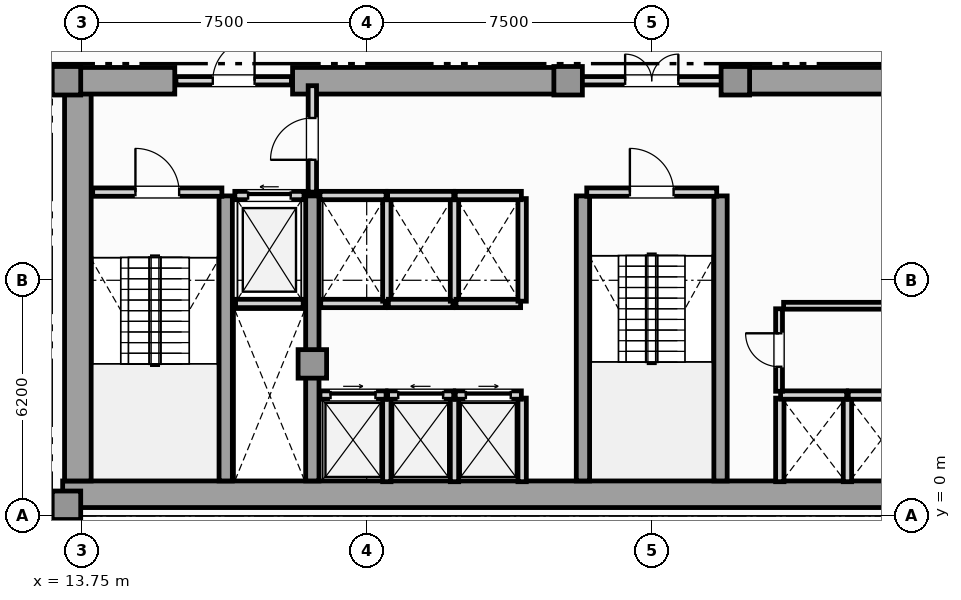
"""IFC4 building model, lengths in metres.
Left out: names, types, materials, properties, quantities, classifications, styles, units other than length and angle.
Written with IfcOpenShell. Run it as: python <this file> out.ifc"""

import sys

from ifc_helpers import new_model, si_unit, direction, frame, frame_2d, origin, origin_2d, place, context, subcontext, project, spatial, rectangle, extrude, element, fill, save


model = new_model("IFC4")
c1 = context("Model", 3, precision=1e-05, world=origin(), true_north=direction((0.0, 1.0)))
c2 = subcontext(c1, "Body", "Model", "MODEL_VIEW")
j1 = project(units=[si_unit("LENGTHUNIT", "METRE"), si_unit("PLANEANGLEUNIT", "RADIAN")], contexts=[c1])
p1 = place(None, origin())
s1 = spatial("IfcSite", under=j1, at=p1, CompositionType="ELEMENT")
p2 = place(p1, origin())
s2 = spatial("IfcBuilding", under=s1, at=p2, CompositionType="ELEMENT")
p3 = place(p2, frame((0.0, 0.0, 96.45)))
s3 = spatial("IfcBuildingStorey", under=s2, at=p3, CompositionType="ELEMENT", Elevation=96.45)
p4 = place(p3, frame((13.25, 0.57, 0.0), z_axis=(0.0, 0.0, 1.0), x_axis=(1.0, 0.0, 0.0)))
e1 = element("IfcWall", 1, at=p4, inside=s3, PredefinedType="SHEAR", context=c2, shape_type="SweptSolid", body=[
    extrude(rectangle(XDim=31.0, YDim=0.7, at=frame_2d((15.5, 0.0))), origin(), (0.0, 0.0, 1.0), 3.6),
])
p5 = place(p3, frame((13.65, 0.92, 0.0), z_axis=(0.0, 0.0, 1.0), x_axis=(0.0, 1.0, 0.0)))
e2 = element("IfcWall", 2, at=p5, inside=s3, PredefinedType="SHEAR", context=c2, shape_type="SweptSolid", body=[
    extrude(rectangle(XDim=10.53, YDim=0.7, at=frame_2d((5.265, 0.0))), origin(), (0.0, 0.0, 1.0), 3.6),
])
p6 = place(p3, frame((13.25, 11.45, 0.0), z_axis=(0.0, 0.0, 1.0), x_axis=(1.0, 0.0, 0.0)))
e3 = element("IfcWall", 3, at=p6, inside=s3, PredefinedType="SHEAR", context=c2, shape_type="SweptSolid", body=[
    extrude(rectangle(XDim=2.95, YDim=0.7, at=frame_2d((1.475, 0.0))), origin(), (0.0, 0.0, 1.0), 3.6),
])
for number, where, z_axis, x_axis in (
    (4, (19.3, 11.45, 0.0), (0.0, 0.0, 1.0), (1.0, 0.0, 0.0)),
    (5, (30.9, 11.45, 0.0), (0.0, 0.0, 1.0), (1.0, 0.0, 0.0)),
):
    element("IfcWall", number, at=place(p3, frame(where, z_axis=z_axis, x_axis=x_axis)), inside=s3, PredefinedType="SHEAR", context=c2, shape_type="SweptSolid", body=[
        extrude(rectangle(XDim=7.3, YDim=0.7, at=frame_2d((3.65, 0.0))), origin(), (0.0, 0.0, 1.0), 3.6),
    ])
for number, where, z_axis, x_axis in (
    (6, (17.54, 0.92, 0.0), (0.0, 0.0, 1.0), (0.0, 1.0, 0.0)),
    (7, (19.82, 0.92, 0.0), (0.0, 0.0, 1.0), (0.0, 1.0, 0.0)),
    (8, (26.94, 0.92, 0.0), (0.0, 0.0, 1.0), (0.0, 1.0, 0.0)),
    (9, (30.56, 0.92, 0.0), (0.0, 0.0, 1.0), (0.0, 1.0, 0.0)),
):
    element("IfcWall", number, at=place(p3, frame(where, z_axis=z_axis, x_axis=x_axis)), inside=s3, PredefinedType="SHEAR", context=c2, shape_type="SweptSolid", body=[
        extrude(rectangle(XDim=7.5, YDim=0.35, at=frame_2d((3.75, 0.0))), origin(), (0.0, 0.0, 1.0), 3.6),
    ])
for number, where, z_axis, x_axis in (
    (10, (13.35, 0.28, 0.0), (0.0, 0.0, 1.0), (1.0, 0.0, 0.0)),
    (11, (13.35, 11.45, 0.0), (0.0, 0.0, 1.0), (1.0, 0.0, 0.0)),
    (12, (19.82, 4.0, 0.0), (0.0, 0.0, 1.0), (1.0, 0.0, 0.0)),
    (13, (26.55, 11.45, 0.0), (0.0, 0.0, 1.0), (1.0, 0.0, 0.0)),
    (14, (30.95, 11.45, 0.0), (0.0, 0.0, 1.0), (1.0, 0.0, 0.0)),
):
    element("IfcColumn", number, at=place(p3, frame(where, z_axis=z_axis, x_axis=x_axis)), inside=s3, PredefinedType="COLUMN", context=c2, shape_type="SweptSolid", body=[
        extrude(rectangle(XDim=0.75, YDim=0.75, at=origin_2d()), origin(), (0.0, 0.0, 1.0), 3.85),
    ])
p7 = place(p3, frame((5.84, 0.18, 0.0), z_axis=(0.0, 0.0, 1.0), x_axis=(1.0, 0.0, 0.0)))
e15 = element("IfcWall", 15, at=p7, inside=s3, PredefinedType="SOLIDWALL", context=c2, shape_type="SweptSolid", body=[
    extrude(rectangle(XDim=7.41, YDim=0.35, at=frame_2d((3.705, 0.0))), origin(), (0.0, 0.0, 1.0), 3.6),
])
p8 = place(p7, frame((2.655, 0.0, 0.85)))
e16 = element("IfcOpeningElement", 16, at=p8, cuts=e15, PredefinedType="OPENING", context=c2, shape_type="SweptSolid", body=[
    extrude(rectangle(XDim=2.1, YDim=2.05, at=frame_2d((1.05, 1.025))), frame((0.0, 0.185, 0.0), z_axis=(0.0, -1.0, 0.0), x_axis=(1.0, 0.0, 0.0)), (0.0, 0.0, 1.0), 0.37),
])
p9 = place(p3, frame((17.8, 5.59, 0.0), z_axis=(0.0, 0.0, 1.0), x_axis=(1.0, 0.0, 0.0)))
e17 = element("IfcWall", 17, at=p9, inside=s3, PredefinedType="SOLIDWALL", context=c2, shape_type="SweptSolid", body=[
    extrude(rectangle(XDim=1.78, YDim=0.22, at=frame_2d((0.89, 0.0))), origin(), (0.0, 0.0, 1.0), 3.6),
])
p10 = place(p3, frame((17.78, 8.43, 0.0), z_axis=(0.0, 0.0, 1.0), x_axis=(1.0, 0.0, 0.0)))
e18 = element("IfcWall", 18, at=p10, inside=s3, PredefinedType="SOLIDWALL", context=c2, shape_type="SweptSolid", body=[
    extrude(rectangle(XDim=1.82, YDim=0.22, at=frame_2d((0.91, 0.0))), origin(), (0.0, 0.0, 1.0), 3.6),
])
p11 = place(p10, frame((0.35, 0.0, 0.0)))
e19 = element("IfcOpeningElement", 19, at=p11, cuts=e18, PredefinedType="OPENING", context=c2, shape_type="SweptSolid", body=[
    extrude(rectangle(XDim=1.12, YDim=2.25, at=frame_2d((0.56, 1.125))), frame((0.0, 0.12, 0.0), z_axis=(0.0, -1.0, 0.0), x_axis=(1.0, 0.0, 0.0)), (0.0, 0.0, 1.0), 0.24),
])
p12 = place(p3, frame((21.78, 0.9, 0.0), z_axis=(0.0, 0.0, 1.0), x_axis=(0.0, 1.0, 0.0)))
e20 = element("IfcWall", 20, at=p12, inside=s3, PredefinedType="SOLIDWALL", context=c2, shape_type="SweptSolid", body=[
    extrude(rectangle(XDim=2.2, YDim=0.22, at=frame_2d((1.1, 0.0))), origin(), (0.0, 0.0, 1.0), 3.6),
])
p13 = place(p3, frame((20.02, 3.18, 0.0), z_axis=(0.0, 0.0, 1.0), x_axis=(1.0, 0.0, 0.0)))
e21 = element("IfcWall", 21, at=p13, inside=s3, PredefinedType="SOLIDWALL", context=c2, shape_type="SweptSolid", body=[
    extrude(rectangle(XDim=1.74, YDim=0.22, at=frame_2d((0.87, 0.0))), origin(), (0.0, 0.0, 1.0), 3.6),
])
p14 = place(p13, frame((0.28, 0.0, 0.0)))
e22 = element("IfcOpeningElement", 22, at=p14, cuts=e21, PredefinedType="OPENING", context=c2, shape_type="SweptSolid", body=[
    extrude(rectangle(XDim=1.18, YDim=2.2, at=frame_2d((0.59, 1.1))), frame((0.0, 0.12, 0.0), z_axis=(0.0, -1.0, 0.0), x_axis=(1.0, 0.0, 0.0)), (0.0, 0.0, 1.0), 0.24),
])
p15 = place(p3, frame((23.56, 0.9, 0.0), z_axis=(0.0, 0.0, 1.0), x_axis=(0.0, 1.0, 0.0)))
e23 = element("IfcWall", 23, at=p15, inside=s3, PredefinedType="SOLIDWALL", context=c2, shape_type="SweptSolid", body=[
    extrude(rectangle(XDim=2.2, YDim=0.22, at=frame_2d((1.1, 0.0))), origin(), (0.0, 0.0, 1.0), 3.6),
])
p16 = place(p3, frame((21.8, 3.18, 0.0), z_axis=(0.0, 0.0, 1.0), x_axis=(1.0, 0.0, 0.0)))
e24 = element("IfcWall", 24, at=p16, inside=s3, PredefinedType="SOLIDWALL", context=c2, shape_type="SweptSolid", body=[
    extrude(rectangle(XDim=1.74, YDim=0.22, at=frame_2d((0.87, 0.0))), origin(), (0.0, 0.0, 1.0), 3.6),
])
p17 = place(p16, frame((0.28, 0.0, 0.0)))
e25 = element("IfcOpeningElement", 25, at=p17, cuts=e24, PredefinedType="OPENING", context=c2, shape_type="SweptSolid", body=[
    extrude(rectangle(XDim=1.18, YDim=2.2, at=frame_2d((0.59, 1.1))), frame((0.0, 0.12, 0.0), z_axis=(0.0, -1.0, 0.0), x_axis=(1.0, 0.0, 0.0)), (0.0, 0.0, 1.0), 0.24),
])
p18 = place(p3, frame((25.34, 0.9, 0.0), z_axis=(0.0, 0.0, 1.0), x_axis=(0.0, 1.0, 0.0)))
e26 = element("IfcWall", 26, at=p18, inside=s3, PredefinedType="SOLIDWALL", context=c2, shape_type="SweptSolid", body=[
    extrude(rectangle(XDim=2.2, YDim=0.22, at=frame_2d((1.1, 0.0))), origin(), (0.0, 0.0, 1.0), 3.6),
])
p19 = place(p3, frame((23.58, 3.18, 0.0), z_axis=(0.0, 0.0, 1.0), x_axis=(1.0, 0.0, 0.0)))
e27 = element("IfcWall", 27, at=p19, inside=s3, PredefinedType="SOLIDWALL", context=c2, shape_type="SweptSolid", body=[
    extrude(rectangle(XDim=1.74, YDim=0.22, at=frame_2d((0.87, 0.0))), origin(), (0.0, 0.0, 1.0), 3.6),
])
p20 = place(p19, frame((0.28, 0.0, 0.0)))
e28 = element("IfcOpeningElement", 28, at=p20, cuts=e27, PredefinedType="OPENING", context=c2, shape_type="SweptSolid", body=[
    extrude(rectangle(XDim=1.18, YDim=2.2, at=frame_2d((0.59, 1.1))), frame((0.0, 0.12, 0.0), z_axis=(0.0, -1.0, 0.0), x_axis=(1.0, 0.0, 0.0)), (0.0, 0.0, 1.0), 0.24),
])
for number, where, z_axis, x_axis in (
    (29, (32.12, 0.9, 0.0), (0.0, 0.0, 1.0), (0.0, 1.0, 0.0)),
    (30, (33.9, 0.9, 0.0), (0.0, 0.0, 1.0), (0.0, 1.0, 0.0)),
):
    element("IfcWall", number, at=place(p3, frame(where, z_axis=z_axis, x_axis=x_axis)), inside=s3, PredefinedType="SOLIDWALL", context=c2, shape_type="SweptSolid", body=[
        extrude(rectangle(XDim=2.2, YDim=0.22, at=frame_2d((1.1, 0.0))), origin(), (0.0, 0.0, 1.0), 3.6),
    ])
for number, where, z_axis, x_axis in (
    (31, (32.14, 3.18, 0.0), (0.0, 0.0, 1.0), (1.0, 0.0, 0.0)),
    (32, (33.92, 3.18, 0.0), (0.0, 0.0, 1.0), (1.0, 0.0, 0.0)),
):
    element("IfcWall", number, at=place(p3, frame(where, z_axis=z_axis, x_axis=x_axis)), inside=s3, PredefinedType="SOLIDWALL", context=c2, shape_type="SweptSolid", body=[
        extrude(rectangle(XDim=1.74, YDim=0.22, at=frame_2d((0.87, 0.0))), origin(), (0.0, 0.0, 1.0), 3.6),
    ])
p21 = place(p3, frame((20.04, 5.59, 0.0), z_axis=(0.0, 0.0, 1.0), x_axis=(1.0, 0.0, 0.0)))
e33 = element("IfcWall", 33, at=p21, inside=s3, PredefinedType="SOLIDWALL", context=c2, shape_type="SweptSolid", body=[
    extrude(rectangle(XDim=1.7, YDim=0.22, at=frame_2d((0.85, 0.0))), origin(), (0.0, 0.0, 1.0), 3.6),
])
p22 = place(p3, frame((21.78, 5.65, 0.0), z_axis=(0.0, 0.0, 1.0), x_axis=(0.0, 1.0, 0.0)))
e34 = element("IfcWall", 34, at=p22, inside=s3, PredefinedType="SOLIDWALL", context=c2, shape_type="SweptSolid", body=[
    extrude(rectangle(XDim=2.7, YDim=0.22, at=frame_2d((1.35, 0.0))), origin(), (0.0, 0.0, 1.0), 3.6),
])
p23 = place(p3, frame((20.02, 8.43, 0.0), z_axis=(0.0, 0.0, 1.0), x_axis=(1.0, 0.0, 0.0)))
e35 = element("IfcWall", 35, at=p23, inside=s3, PredefinedType="SOLIDWALL", context=c2, shape_type="SweptSolid", body=[
    extrude(rectangle(XDim=1.74, YDim=0.22, at=frame_2d((0.87, 0.0))), origin(), (0.0, 0.0, 1.0), 3.6),
])
p24 = place(p3, frame((21.82, 5.59, 0.0), z_axis=(0.0, 0.0, 1.0), x_axis=(1.0, 0.0, 0.0)))
e36 = element("IfcWall", 36, at=p24, inside=s3, PredefinedType="SOLIDWALL", context=c2, shape_type="SweptSolid", body=[
    extrude(rectangle(XDim=1.7, YDim=0.22, at=frame_2d((0.85, 0.0))), origin(), (0.0, 0.0, 1.0), 3.6),
])
p25 = place(p3, frame((23.56, 5.65, 0.0), z_axis=(0.0, 0.0, 1.0), x_axis=(0.0, 1.0, 0.0)))
e37 = element("IfcWall", 37, at=p25, inside=s3, PredefinedType="SOLIDWALL", context=c2, shape_type="SweptSolid", body=[
    extrude(rectangle(XDim=2.7, YDim=0.22, at=frame_2d((1.35, 0.0))), origin(), (0.0, 0.0, 1.0), 3.6),
])
p26 = place(p3, frame((21.8, 8.43, 0.0), z_axis=(0.0, 0.0, 1.0), x_axis=(1.0, 0.0, 0.0)))
e38 = element("IfcWall", 38, at=p26, inside=s3, PredefinedType="SOLIDWALL", context=c2, shape_type="SweptSolid", body=[
    extrude(rectangle(XDim=1.74, YDim=0.22, at=frame_2d((0.87, 0.0))), origin(), (0.0, 0.0, 1.0), 3.6),
])
p27 = place(p3, frame((23.6, 5.59, 0.0), z_axis=(0.0, 0.0, 1.0), x_axis=(1.0, 0.0, 0.0)))
e39 = element("IfcWall", 39, at=p27, inside=s3, PredefinedType="SOLIDWALL", context=c2, shape_type="SweptSolid", body=[
    extrude(rectangle(XDim=1.7, YDim=0.22, at=frame_2d((0.85, 0.0))), origin(), (0.0, 0.0, 1.0), 3.6),
])
p28 = place(p3, frame((25.34, 5.65, 0.0), z_axis=(0.0, 0.0, 1.0), x_axis=(0.0, 1.0, 0.0)))
e40 = element("IfcWall", 40, at=p28, inside=s3, PredefinedType="SOLIDWALL", context=c2, shape_type="SweptSolid", body=[
    extrude(rectangle(XDim=2.7, YDim=0.22, at=frame_2d((1.35, 0.0))), origin(), (0.0, 0.0, 1.0), 3.6),
])
p29 = place(p3, frame((23.58, 8.43, 0.0), z_axis=(0.0, 0.0, 1.0), x_axis=(1.0, 0.0, 0.0)))
e41 = element("IfcWall", 41, at=p29, inside=s3, PredefinedType="SOLIDWALL", context=c2, shape_type="SweptSolid", body=[
    extrude(rectangle(XDim=1.74, YDim=0.22, at=frame_2d((0.87, 0.0))), origin(), (0.0, 0.0, 1.0), 3.6),
])
p30 = place(p3, frame((14.04, 8.52, 0.0), z_axis=(0.0, 0.0, 1.0), x_axis=(1.0, 0.0, 0.0)))
e42 = element("IfcWall", 42, at=p30, inside=s3, PredefinedType="SOLIDWALL", context=c2, shape_type="SweptSolid", body=[
    extrude(rectangle(XDim=3.4, YDim=0.22, at=frame_2d((1.7, 0.0))), origin(), (0.0, 0.0, 1.0), 3.6),
])
p31 = place(p30, frame((1.125, 0.0, 0.0)))
e43 = element("IfcOpeningElement", 43, at=p31, cuts=e42, PredefinedType="OPENING", context=c2, shape_type="SweptSolid", body=[
    extrude(rectangle(XDim=1.15, YDim=2.2, at=frame_2d((0.575, 1.1))), frame((0.0, 0.12, 0.0), z_axis=(0.0, -1.0, 0.0), x_axis=(1.0, 0.0, 0.0)), (0.0, 0.0, 1.0), 0.24),
])
p32 = place(p3, frame((27.04, 8.52, 0.0), z_axis=(0.0, 0.0, 1.0), x_axis=(1.0, 0.0, 0.0)))
e44 = element("IfcWall", 44, at=p32, inside=s3, PredefinedType="SOLIDWALL", context=c2, shape_type="SweptSolid", body=[
    extrude(rectangle(XDim=3.42, YDim=0.22, at=frame_2d((1.71, 0.0))), origin(), (0.0, 0.0, 1.0), 3.6),
])
p33 = place(p32, frame((1.135, 0.0, 0.0)))
e45 = element("IfcOpeningElement", 45, at=p33, cuts=e44, PredefinedType="OPENING", context=c2, shape_type="SweptSolid", body=[
    extrude(rectangle(XDim=1.15, YDim=2.2, at=frame_2d((0.575, 1.1))), frame((0.0, 0.12, 0.0), z_axis=(0.0, -1.0, 0.0), x_axis=(1.0, 0.0, 0.0)), (0.0, 0.0, 1.0), 0.24),
])
p34 = place(p3, frame((19.82, 8.52, 0.0), z_axis=(0.0, 0.0, 1.0), x_axis=(0.0, 1.0, 0.0)))
e46 = element("IfcWall", 46, at=p34, inside=s3, PredefinedType="SOLIDWALL", context=c2, shape_type="SweptSolid", body=[
    extrude(rectangle(XDim=2.8, YDim=0.22, at=frame_2d((1.4, 0.0))), origin(), (0.0, 0.0, 1.0), 3.056),
])
p35 = place(p34, frame((0.85, 0.0, 0.0)))
e47 = element("IfcOpeningElement", 47, at=p35, cuts=e46, PredefinedType="OPENING", context=c2, shape_type="SweptSolid", body=[
    extrude(rectangle(XDim=1.1, YDim=2.2, at=frame_2d((0.55, 1.1))), frame((0.0, 0.12, 0.0), z_axis=(0.0, -1.0, 0.0), x_axis=(1.0, 0.0, 0.0)), (0.0, 0.0, 1.0), 0.24),
])
p36 = place(p3, frame((16.23, 11.45, 0.0), z_axis=(0.0, 0.0, 1.0), x_axis=(1.0, 0.0, 0.0)))
e48 = element("IfcWall", 48, at=p36, inside=s3, PredefinedType="SOLIDWALL", context=c2, shape_type="SweptSolid", body=[
    extrude(rectangle(XDim=3.04, YDim=0.22, at=frame_2d((1.52, 0.0))), origin(), (0.0, 0.0, 1.0), 3.6),
])
p37 = place(p36, frame((0.97, 0.0, 0.0)))
e49 = element("IfcOpeningElement", 49, at=p37, cuts=e48, PredefinedType="OPENING", context=c2, shape_type="SweptSolid", body=[
    extrude(rectangle(XDim=1.1, YDim=2.2, at=frame_2d((0.55, 1.1))), frame((0.0, 0.12, 0.0), z_axis=(0.0, -1.0, 0.0), x_axis=(1.0, 0.0, 0.0)), (0.0, 0.0, 1.0), 0.24),
])
p38 = place(p3, frame((26.63, 11.45, 0.0), z_axis=(0.0, 0.0, 1.0), x_axis=(1.0, 0.0, 0.0)))
e50 = element("IfcWall", 50, at=p38, inside=s3, PredefinedType="SOLIDWALL", context=c2, shape_type="SweptSolid", body=[
    extrude(rectangle(XDim=4.24, YDim=0.22, at=frame_2d((2.12, 0.0))), origin(), (0.0, 0.0, 1.0), 3.6),
])
p39 = place(p38, frame((1.42, 0.0, 0.0)))
e51 = element("IfcOpeningElement", 51, at=p39, cuts=e50, PredefinedType="OPENING", context=c2, shape_type="SweptSolid", body=[
    extrude(rectangle(XDim=1.4, YDim=2.2, at=frame_2d((0.7, 1.1))), frame((0.0, 0.12, 0.0), z_axis=(0.0, -1.0, 0.0), x_axis=(1.0, 0.0, 0.0)), (0.0, 0.0, 1.0), 0.24),
])
p40 = place(p3, frame((32.1, 3.28, 0.0), z_axis=(0.0, 0.0, 1.0), x_axis=(0.0, 1.0, 0.0)))
e52 = element("IfcWall", 52, at=p40, inside=s3, PredefinedType="PARTITIONING", context=c2, shape_type="SweptSolid", body=[
    extrude(rectangle(XDim=2.17, YDim=0.18, at=frame_2d((1.085, 0.0))), origin(), (0.0, 0.0, 1.0), 3.6),
])
p41 = place(p40, frame((0.645, 0.0, 0.0)))
e53 = element("IfcOpeningElement", 53, at=p41, cuts=e52, PredefinedType="OPENING", context=c2, shape_type="SweptSolid", body=[
    extrude(rectangle(XDim=0.88, YDim=2.05, at=frame_2d((0.44, 1.025))), frame((0.0, 0.1, 0.0), z_axis=(0.0, -1.0, 0.0), x_axis=(1.0, 0.0, 0.0)), (0.0, 0.0, 1.0), 0.2),
])
p42 = place(p3, frame((32.22, 5.53, 0.0), z_axis=(0.0, 0.0, 1.0), x_axis=(1.0, 0.0, 0.0)))
e54 = element("IfcWall", 54, at=p42, inside=s3, PredefinedType="PARTITIONING", context=c2, shape_type="SweptSolid", body=[
    extrude(rectangle(XDim=2.9, YDim=0.18, at=frame_2d((1.45, 0.0))), origin(), (0.0, 0.0, 1.0), 3.6),
])
p43 = place(p3, frame((2.81, 11.6, 0.0), z_axis=(0.0, 0.0, 1.0), x_axis=(1.0, 0.0, 0.0)))
e55 = element("IfcWall", 55, at=p43, inside=s3, PredefinedType="PARTITIONING", context=c2, shape_type="SweptSolid", body=[
    extrude(rectangle(XDim=10.335, YDim=0.18, at=frame_2d((5.167, 0.0))), origin(), (0.0, 0.0, 1.0), 3.6),
])
p44 = place(p43, frame((4.667, 0.0, 0.0)))
e56 = element("IfcOpeningElement", 56, at=p44, cuts=e55, PredefinedType="OPENING", context=c2, shape_type="SweptSolid", body=[
    extrude(rectangle(XDim=1.0, YDim=2.15, at=frame_2d((0.5, 1.075))), frame((0.0, 0.1, 0.0), z_axis=(0.0, -1.0, 0.0), x_axis=(1.0, 0.0, 0.0)), (0.0, 0.0, 1.0), 0.2),
])
p45 = place(p11, origin())
e57 = element("IfcDoor", 57, at=p45, inside=s3, OperationType="SLIDING_TO_LEFT", PredefinedType="DOOR", context=c2, shape_type="SweptSolid", body=[
    extrude(rectangle(XDim=1.12, YDim=2.25, at=frame_2d((0.56, 1.125))), frame((0.0, 0.025, 0.0), z_axis=(0.0, -1.0, 0.0), x_axis=(1.0, 0.0, 0.0)), (0.0, 0.0, 1.0), 0.05),
])
fill(e19, e57)
p46 = place(p14, origin())
e58 = element("IfcDoor", 58, at=p46, inside=s3, OperationType="SLIDING_TO_RIGHT", PredefinedType="DOOR", context=c2, shape_type="SweptSolid", body=[
    extrude(rectangle(XDim=1.18, YDim=2.2, at=frame_2d((0.59, 1.1))), frame((0.0, 0.025, 0.0), z_axis=(0.0, -1.0, 0.0), x_axis=(1.0, 0.0, 0.0)), (0.0, 0.0, 1.0), 0.05),
])
fill(e22, e58)
p47 = place(p17, origin())
e59 = element("IfcDoor", 59, at=p47, inside=s3, OperationType="SLIDING_TO_LEFT", PredefinedType="DOOR", context=c2, shape_type="SweptSolid", body=[
    extrude(rectangle(XDim=1.18, YDim=2.2, at=frame_2d((0.59, 1.1))), frame((0.0, 0.025, 0.0), z_axis=(0.0, -1.0, 0.0), x_axis=(1.0, 0.0, 0.0)), (0.0, 0.0, 1.0), 0.05),
])
fill(e25, e59)
p48 = place(p20, origin())
e60 = element("IfcDoor", 60, at=p48, inside=s3, OperationType="SLIDING_TO_RIGHT", PredefinedType="DOOR", context=c2, shape_type="SweptSolid", body=[
    extrude(rectangle(XDim=1.18, YDim=2.2, at=frame_2d((0.59, 1.1))), frame((0.0, 0.025, 0.0), z_axis=(0.0, -1.0, 0.0), x_axis=(1.0, 0.0, 0.0)), (0.0, 0.0, 1.0), 0.05),
])
fill(e28, e60)
p49 = place(p31, origin())
e61 = element("IfcDoor", 61, at=p49, inside=s3, OperationType="SINGLE_SWING_LEFT", PredefinedType="DOOR", context=c2, shape_type="SweptSolid", body=[
    extrude(rectangle(XDim=1.15, YDim=2.2, at=frame_2d((0.575, 1.1))), frame((0.0, 0.025, 0.0), z_axis=(0.0, -1.0, 0.0), x_axis=(1.0, 0.0, 0.0)), (0.0, 0.0, 1.0), 0.05),
])
fill(e43, e61)
p50 = place(p33, origin())
e62 = element("IfcDoor", 62, at=p50, inside=s3, OperationType="SINGLE_SWING_LEFT", PredefinedType="DOOR", context=c2, shape_type="SweptSolid", body=[
    extrude(rectangle(XDim=1.15, YDim=2.2, at=frame_2d((0.575, 1.1))), frame((0.0, 0.025, 0.0), z_axis=(0.0, -1.0, 0.0), x_axis=(1.0, 0.0, 0.0)), (0.0, 0.0, 1.0), 0.05),
])
fill(e45, e62)
p51 = place(p35, origin())
e63 = element("IfcDoor", 63, at=p51, inside=s3, OperationType="SINGLE_SWING_LEFT", PredefinedType="DOOR", context=c2, shape_type="SweptSolid", body=[
    extrude(rectangle(XDim=1.1, YDim=2.2, at=frame_2d((0.55, 1.1))), frame((0.0, 0.025, 0.0), z_axis=(0.0, -1.0, 0.0), x_axis=(1.0, 0.0, 0.0)), (0.0, 0.0, 1.0), 0.05),
])
fill(e47, e63)
p52 = place(p37, origin())
e64 = element("IfcDoor", 64, at=p52, inside=s3, OperationType="SINGLE_SWING_RIGHT", PredefinedType="DOOR", context=c2, shape_type="SweptSolid", body=[
    extrude(rectangle(XDim=1.1, YDim=2.2, at=frame_2d((0.55, 1.1))), frame((0.0, 0.025, 0.0), z_axis=(0.0, -1.0, 0.0), x_axis=(1.0, 0.0, 0.0)), (0.0, 0.0, 1.0), 0.05),
])
fill(e49, e64)
p53 = place(p39, origin())
e65 = element("IfcDoor", 65, at=p53, inside=s3, OperationType="DOUBLE_DOOR_SINGLE_SWING", PredefinedType="DOOR", context=c2, shape_type="SweptSolid", body=[
    extrude(rectangle(XDim=1.4, YDim=2.2, at=frame_2d((0.7, 1.1))), frame((0.0, 0.025, 0.0), z_axis=(0.0, -1.0, 0.0), x_axis=(1.0, 0.0, 0.0)), (0.0, 0.0, 1.0), 0.05),
])
fill(e51, e65)
p54 = place(p41, origin())
e66 = element("IfcDoor", 66, at=p54, inside=s3, OperationType="SINGLE_SWING_RIGHT", PredefinedType="DOOR", context=c2, shape_type="SweptSolid", body=[
    extrude(rectangle(XDim=0.88, YDim=2.05, at=frame_2d((0.44, 1.025))), frame((0.0, 0.025, 0.0), z_axis=(0.0, -1.0, 0.0), x_axis=(1.0, 0.0, 0.0)), (0.0, 0.0, 1.0), 0.05),
])
fill(e53, e66)
save(model, sys.argv[1])
